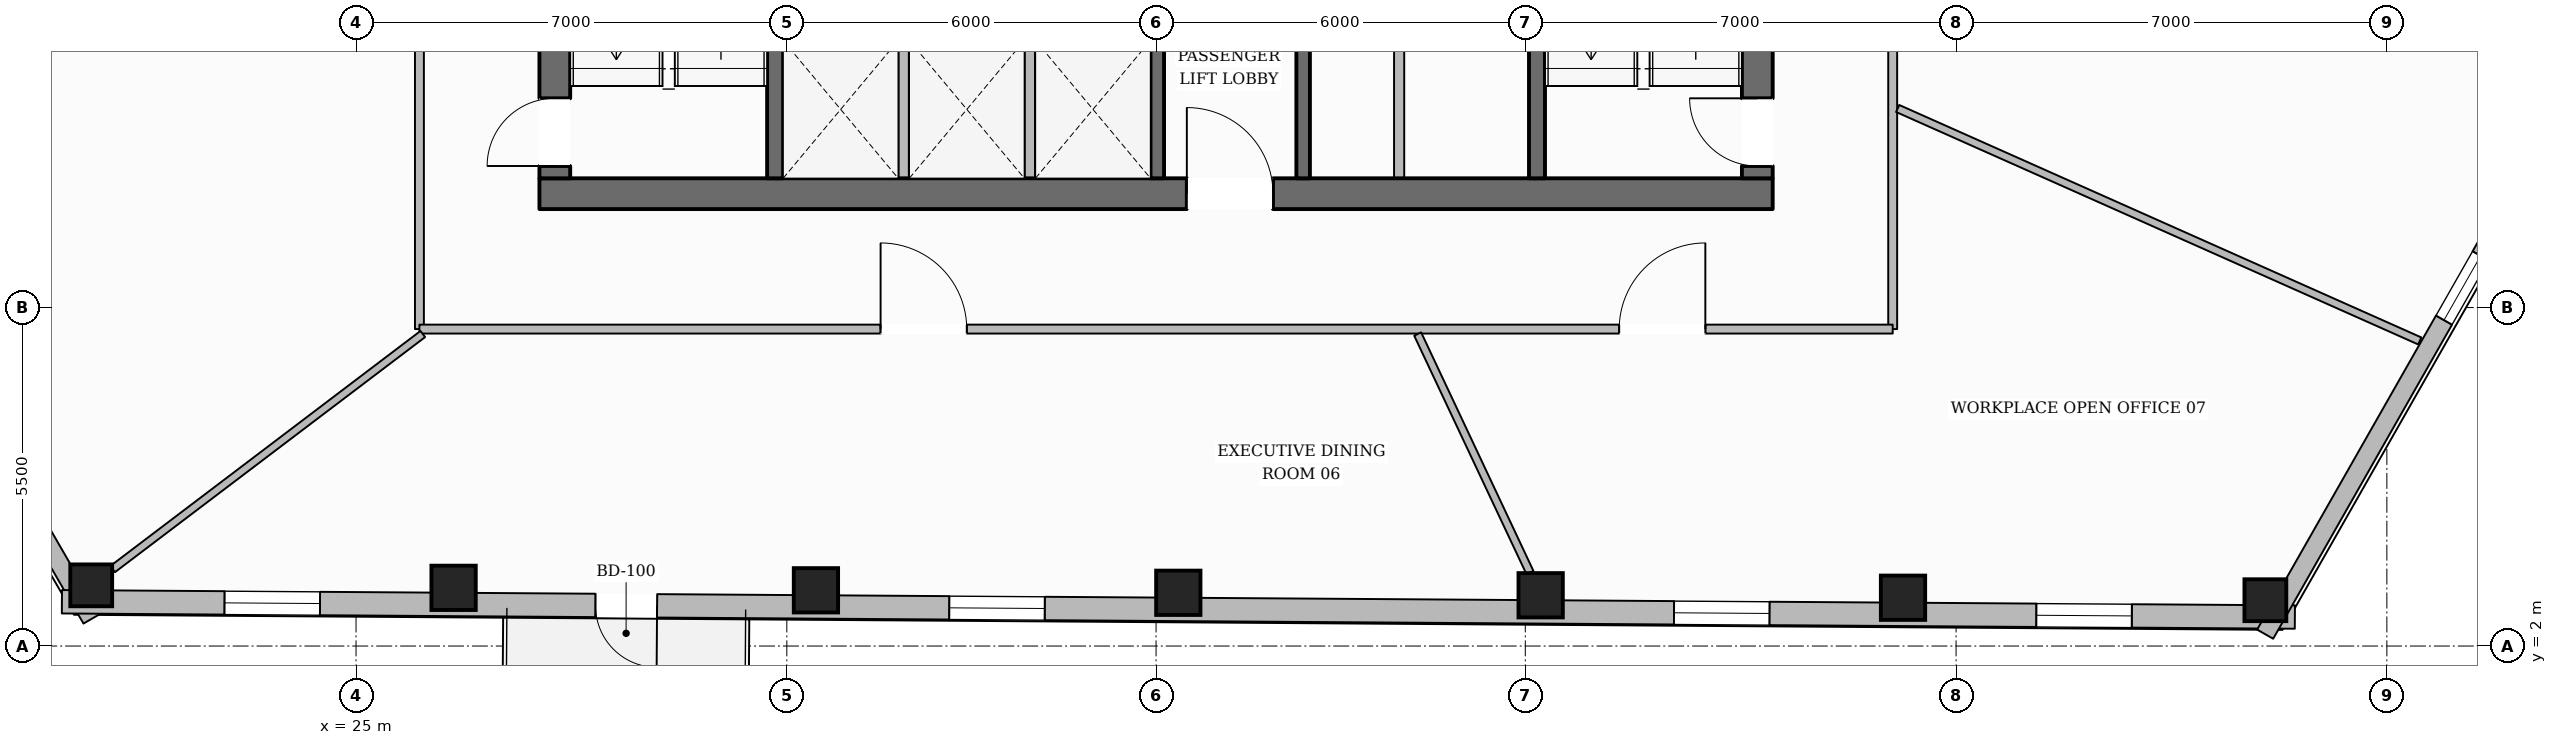
"""IFC4 building model, lengths in metres.
Left out: names, types, materials, properties, quantities, classifications, styles, units other than length and angle.
Written with IfcOpenShell. Run it as: python <this file> out.ifc"""

import sys

from ifc_helpers import new_model, si_unit, direction, frame, frame_2d, origin, origin_2d, place, context, subcontext, project, spatial, rectangle, hollow_rectangle, extrude, element, fill, save


model = new_model("IFC4")
c1 = context("Model", 3, precision=1e-05, world=origin(), true_north=direction((0.0, 1.0)))
c2 = subcontext(c1, "Body", "Model", "MODEL_VIEW")
j1 = project(units=[si_unit("LENGTHUNIT", "METRE"), si_unit("PLANEANGLEUNIT", "RADIAN")], contexts=[c1])
p1 = place(None, origin())
s1 = spatial("IfcSite", under=j1, at=p1, CompositionType="ELEMENT")
p2 = place(p1, origin())
s2 = spatial("IfcBuilding", under=s1, at=p2, CompositionType="ELEMENT")
p3 = place(p2, frame((0.0, 0.0, 112.45)))
s3 = spatial("IfcBuildingStorey", under=s2, at=p3, CompositionType="ELEMENT", Elevation=112.45)
p4 = place(p3, frame((27.98, 9.35, 0.0), z_axis=(0.0, 0.0, 1.0), x_axis=(1.0, 0.0, 0.0)))
e1 = element("IfcWall", 1, at=p4, inside=s3, PredefinedType="SOLIDWALL", context=c2, shape_type="SweptSolid", body=[
    extrude(rectangle(XDim=20.04, YDim=0.5, at=frame_2d((10.02, 0.0))), origin(), (0.0, 0.0, 1.0), 3.6),
])
p5 = place(p4, frame((10.52, 0.0, 0.0)))
e2 = element("IfcOpeningElement", 2, at=p5, cuts=e1, PredefinedType="OPENING", context=c2, shape_type="SweptSolid", body=[
    extrude(rectangle(XDim=1.4, YDim=2.2, at=frame_2d((0.7, 1.1))), frame((0.0, 0.26, 0.0), z_axis=(0.0, -1.0, 0.0), x_axis=(1.0, 0.0, 0.0)), (0.0, 0.0, 1.0), 0.52),
])
p6 = place(p3, frame((28.23, 9.6, 0.0), z_axis=(0.0, 0.0, 1.0), x_axis=(0.0, 1.0, 0.0)))
e3 = element("IfcWall", 3, at=p6, inside=s3, PredefinedType="SOLIDWALL", context=c2, shape_type="SweptSolid", body=[
    extrude(rectangle(XDim=13.0, YDim=0.5, at=frame_2d((6.5, 0.0))), origin(), (0.0, 0.0, 1.0), 3.6),
])
p7 = place(p6, frame((0.2, 0.0, 0.0)))
e4 = element("IfcOpeningElement", 4, at=p7, cuts=e3, PredefinedType="OPENING", context=c2, shape_type="SweptSolid", body=[
    extrude(rectangle(XDim=1.1, YDim=2.15, at=frame_2d((0.55, 1.075))), frame((0.0, 0.26, 0.0), z_axis=(0.0, -1.0, 0.0), x_axis=(1.0, 0.0, 0.0)), (0.0, 0.0, 1.0), 0.52),
])
p8 = place(p6, frame((8.4, 0.0, 0.0)))
e5 = element("IfcOpeningElement", 5, at=p8, cuts=e3, PredefinedType="OPENING", context=c2, shape_type="SweptSolid", body=[
    extrude(rectangle(XDim=0.9, YDim=2.1, at=frame_2d((0.45, 1.05))), frame((0.0, 0.26, 0.0), z_axis=(0.0, -1.0, 0.0), x_axis=(1.0, 0.0, 0.0)), (0.0, 0.0, 1.0), 0.52),
])
p9 = place(p3, frame((47.77, 9.6, 0.0), z_axis=(0.0, 0.0, 1.0), x_axis=(0.0, 1.0, 0.0)))
e6 = element("IfcWall", 6, at=p9, inside=s3, PredefinedType="SOLIDWALL", context=c2, shape_type="SweptSolid", body=[
    extrude(rectangle(XDim=13.0, YDim=0.5, at=frame_2d((6.5, 0.0))), origin(), (0.0, 0.0, 1.0), 3.6),
])
p10 = place(p9, frame((0.2, 0.0, 0.0)))
e7 = element("IfcOpeningElement", 7, at=p10, cuts=e6, PredefinedType="OPENING", context=c2, shape_type="SweptSolid", body=[
    extrude(rectangle(XDim=1.1, YDim=2.15, at=frame_2d((0.55, 1.075))), frame((0.0, 0.26, 0.0), z_axis=(0.0, -1.0, 0.0), x_axis=(1.0, 0.0, 0.0)), (0.0, 0.0, 1.0), 0.52),
])
p11 = place(p9, frame((8.4, 0.0, 0.0)))
e8 = element("IfcOpeningElement", 8, at=p11, cuts=e6, PredefinedType="OPENING", context=c2, shape_type="SweptSolid", body=[
    extrude(rectangle(XDim=0.9, YDim=2.1, at=frame_2d((0.45, 1.05))), frame((0.0, 0.26, 0.0), z_axis=(0.0, -1.0, 0.0), x_axis=(1.0, 0.0, 0.0)), (0.0, 0.0, 1.0), 0.52),
])
p12 = place(p3, frame((31.81, 9.6, 0.0), z_axis=(0.0, 0.0, 1.0), x_axis=(0.0, 1.0, 0.0)))
e9 = element("IfcWall", 9, at=p12, inside=s3, PredefinedType="SHEAR", context=c2, shape_type="SweptSolid", body=[
    extrude(rectangle(XDim=13.0, YDim=0.26, at=frame_2d((6.5, 0.0))), origin(), (0.0, 0.0, 1.0), 3.6),
])
p13 = place(p12, frame((10.925, 0.0, 0.0)))
e10 = element("IfcOpeningElement", 10, at=p13, cuts=e9, PredefinedType="OPENING", context=c2, shape_type="SweptSolid", body=[
    extrude(rectangle(XDim=1.25, YDim=2.25, at=frame_2d((0.625, 1.125))), frame((0.0, 0.14, 0.0), z_axis=(0.0, -1.0, 0.0), x_axis=(1.0, 0.0, 0.0)), (0.0, 0.0, 1.0), 0.28),
])
p14 = place(p3, frame((44.19, 9.6, 0.0), z_axis=(0.0, 0.0, 1.0), x_axis=(0.0, 1.0, 0.0)))
e11 = element("IfcWall", 11, at=p14, inside=s3, PredefinedType="SHEAR", context=c2, shape_type="SweptSolid", body=[
    extrude(rectangle(XDim=13.0, YDim=0.26, at=frame_2d((6.5, 0.0))), origin(), (0.0, 0.0, 1.0), 3.6),
])
p15 = place(p14, frame((10.925, 0.0, 0.0)))
e12 = element("IfcOpeningElement", 12, at=p15, cuts=e11, PredefinedType="OPENING", context=c2, shape_type="SweptSolid", body=[
    extrude(rectangle(XDim=1.25, YDim=2.25, at=frame_2d((0.625, 1.125))), frame((0.0, 0.14, 0.0), z_axis=(0.0, -1.0, 0.0), x_axis=(1.0, 0.0, 0.0)), (0.0, 0.0, 1.0), 0.28),
])
for number, where, z_axis, x_axis in (
    (13, (38.02, 9.6, 0.0), (0.0, 0.0, 1.0), (0.0, 1.0, 0.0)),
    (14, (40.39, 9.6, 0.0), (0.0, 0.0, 1.0), (0.0, 1.0, 0.0)),
):
    element("IfcWall", number, at=place(p3, frame(where, z_axis=z_axis, x_axis=x_axis)), inside=s3, PredefinedType="SOLIDWALL", context=c2, shape_type="SweptSolid", body=[
        extrude(rectangle(XDim=2.24, YDim=0.22, at=frame_2d((1.12, 0.0))), origin(), (0.0, 0.0, 1.0), 3.6),
    ])
p16 = place(p3, frame((20.697, 2.986, 0.0), z_axis=(0.0, 0.0, 1.0), x_axis=(1.0, 0.0, 0.0)))
e15 = element("IfcColumn", 15, at=p16, inside=s3, PredefinedType="COLUMN", context=c2, shape_type="SweptSolid", body=[
    extrude(hollow_rectangle(XDim=0.68, YDim=0.68, WallThickness=0.03, at=origin_2d()), origin(), (0.0, 0.0, 1.0), 3.6),
])
for number, where, z_axis, x_axis in (
    (16, (26.585, 2.946, 0.0), (0.0, 0.0, 1.0), (1.0, 0.0, 0.0)),
    (17, (32.473, 2.906, 0.0), (0.0, 0.0, 1.0), (1.0, 0.0, 0.0)),
    (18, (38.361, 2.865, 0.0), (0.0, 0.0, 1.0), (1.0, 0.0, 0.0)),
    (19, (44.25, 2.825, 0.0), (0.0, 0.0, 1.0), (1.0, 0.0, 0.0)),
    (20, (50.138, 2.785, 0.0), (0.0, 0.0, 1.0), (1.0, 0.0, 0.0)),
):
    element("IfcColumn", number, at=place(p3, frame(where, z_axis=z_axis, x_axis=x_axis)), inside=s3, PredefinedType="COLUMN", context=c2, shape_type="SweptSolid", body=[
        extrude(hollow_rectangle(XDim=0.72, YDim=0.72, WallThickness=0.032, at=origin_2d()), origin(), (0.0, 0.0, 1.0), 3.6),
    ])
p17 = place(p3, frame((56.026, 2.744, 0.0), z_axis=(0.0, 0.0, 1.0), x_axis=(1.0, 0.0, 0.0)))
e21 = element("IfcColumn", 21, at=p17, inside=s3, PredefinedType="COLUMN", context=c2, shape_type="SweptSolid", body=[
    extrude(hollow_rectangle(XDim=0.68, YDim=0.68, WallThickness=0.03, at=origin_2d()), origin(), (0.0, 0.0, 1.0), 3.6),
])
p18 = place(p3, frame((20.701, 2.44, 0.0), z_axis=(0.0, 0.0, 1.0), x_axis=(-0.50082386504, 0.86554922229, 0.0)))
e22 = element("IfcWall", 22, at=p18, inside=s3, PredefinedType="STANDARD", context=c2, shape_type="SweptSolid", body=[
    extrude(rectangle(XDim=13.095, YDim=0.3, at=frame_2d((6.548, 0.0))), origin(), (0.0, 0.0, 1.0), 3.059),
])
p19 = place(p18, frame((5.948, 0.0, 0.65)))
e23 = element("IfcOpeningElement", 23, at=p19, cuts=e22, PredefinedType="OPENING", context=c2, shape_type="SweptSolid", body=[
    extrude(rectangle(XDim=1.2, YDim=1.7, at=frame_2d((0.6, 0.85))), frame((0.0, 0.16, 0.0), z_axis=(0.0, -1.0, 0.0), x_axis=(1.0, 0.0, 0.0)), (0.0, 0.0, 1.0), 0.32),
])
p20 = place(p3, frame((56.505, 2.471, 0.0), z_axis=(0.0, 0.0, 1.0), x_axis=(-0.999976634765, 0.0068359289, 0.0)))
e24 = element("IfcWall", 24, at=p20, inside=s3, PredefinedType="STANDARD", context=c2, shape_type="SweptSolid", body=[
    extrude(rectangle(XDim=36.286, YDim=0.38, at=frame_2d((18.143, 0.0))), origin(), (0.0, 0.0, 1.0), 3.059),
])
p21 = place(p20, frame((26.614, 0.0, 0.0)))
e25 = element("IfcOpeningElement", 25, at=p21, cuts=e24, PredefinedType="OPENING", context=c2, shape_type="SweptSolid", body=[
    extrude(rectangle(XDim=1.0, YDim=2.2, at=frame_2d((0.5, 1.1))), frame((0.0, 0.2, 0.0), z_axis=(0.0, -1.0, 0.0), x_axis=(1.0, 0.0, 0.0)), (0.0, 0.0, 1.0), 0.4),
])
p22 = place(p20, frame((32.092, 0.0, 0.65)))
e26 = element("IfcOpeningElement", 26, at=p22, cuts=e24, PredefinedType="OPENING", context=c2, shape_type="SweptSolid", body=[
    extrude(rectangle(XDim=1.55, YDim=1.75, at=frame_2d((0.775, 0.875))), frame((0.0, 0.2, 0.0), z_axis=(0.0, -1.0, 0.0), x_axis=(1.0, 0.0, 0.0)), (0.0, 0.0, 1.0), 0.4),
])
p23 = place(p20, frame((20.315, 0.0, 0.65)))
e27 = element("IfcOpeningElement", 27, at=p23, cuts=e24, PredefinedType="OPENING", context=c2, shape_type="SweptSolid", body=[
    extrude(rectangle(XDim=1.55, YDim=1.75, at=frame_2d((0.775, 0.875))), frame((0.0, 0.2, 0.0), z_axis=(0.0, -1.0, 0.0), x_axis=(1.0, 0.0, 0.0)), (0.0, 0.0, 1.0), 0.4),
])
p24 = place(p20, frame((8.539, 0.0, 0.65)))
e28 = element("IfcOpeningElement", 28, at=p24, cuts=e24, PredefinedType="OPENING", context=c2, shape_type="SweptSolid", body=[
    extrude(rectangle(XDim=1.55, YDim=1.75, at=frame_2d((0.775, 0.875))), frame((0.0, 0.2, 0.0), z_axis=(0.0, -1.0, 0.0), x_axis=(1.0, 0.0, 0.0)), (0.0, 0.0, 1.0), 0.4),
])
p25 = place(p20, frame((2.65, 0.0, 0.65)))
e29 = element("IfcOpeningElement", 29, at=p25, cuts=e24, PredefinedType="OPENING", context=c2, shape_type="SweptSolid", body=[
    extrude(rectangle(XDim=1.55, YDim=1.75, at=frame_2d((0.775, 0.875))), frame((0.0, 0.2, 0.0), z_axis=(0.0, -1.0, 0.0), x_axis=(1.0, 0.0, 0.0)), (0.0, 0.0, 1.0), 0.4),
])
p26 = place(p3, frame((62.429, 13.442, 0.0), z_axis=(0.0, 0.0, 1.0), x_axis=(-0.49490368697, -0.868947835387, 0.0)))
e30 = element("IfcWall", 30, at=p26, inside=s3, PredefinedType="STANDARD", context=c2, shape_type="SweptSolid", body=[
    extrude(rectangle(XDim=12.946, YDim=0.3, at=frame_2d((6.473, 0.0))), origin(), (0.0, 0.0, 1.0), 3.059),
])
p27 = place(p26, frame((5.873, 0.0, 0.65)))
e31 = element("IfcOpeningElement", 31, at=p27, cuts=e30, PredefinedType="OPENING", context=c2, shape_type="SweptSolid", body=[
    extrude(rectangle(XDim=1.2, YDim=1.7, at=frame_2d((0.6, 0.85))), frame((0.0, 0.16, 0.0), z_axis=(0.0, -1.0, 0.0), x_axis=(1.0, 0.0, 0.0)), (0.0, 0.0, 1.0), 0.32),
])
for number, where, z_axis, x_axis in (
    (32, (33.9, 9.55, 0.0), (0.0, 0.0, 1.0), (0.0, 1.0, 0.0)),
    (33, (35.95, 9.55, 0.0), (0.0, 0.0, 1.0), (0.0, 1.0, 0.0)),
    (34, (41.95, 9.55, 0.0), (0.0, 0.0, 1.0), (0.0, 1.0, 0.0)),
):
    element("IfcWall", number, at=place(p3, frame(where, z_axis=z_axis, x_axis=x_axis)), inside=s3, PredefinedType="PARTITIONING", context=c2, shape_type="SweptSolid", body=[
        extrude(rectangle(XDim=2.29, YDim=0.165, at=frame_2d((1.145, 0.0))), origin(), (0.0, 0.0, 1.0), 3.6),
    ])
p28 = place(p3, frame((49.97, 7.15, 0.0), z_axis=(0.0, 0.0, 1.0), x_axis=(0.0, 1.0, 0.0)))
e35 = element("IfcWall", 35, at=p28, inside=s3, PredefinedType="PARTITIONING", context=c2, shape_type="SweptSolid", body=[
    extrude(rectangle(XDim=17.9, YDim=0.145, at=frame_2d((8.95, 0.0))), origin(), (0.0, 0.0, 1.0), 3.288),
])
p29 = place(p28, frame((8.222, 0.0, 0.0)))
e36 = element("IfcOpeningElement", 36, at=p29, cuts=e35, PredefinedType="OPENING", context=c2, shape_type="SweptSolid", body=[
    extrude(rectangle(XDim=1.02, YDim=2.15, at=frame_2d((0.51, 1.075))), frame((0.0, 0.083, 0.0), z_axis=(0.0, -1.0, 0.0), x_axis=(1.0, 0.0, 0.0)), (0.0, 0.0, 1.0), 0.165),
])
p30 = place(p3, frame((26.03, 25.05, 0.0), z_axis=(0.0, 0.0, 1.0), x_axis=(0.0, -1.0, 0.0)))
e37 = element("IfcWall", 37, at=p30, inside=s3, PredefinedType="PARTITIONING", context=c2, shape_type="SweptSolid", body=[
    extrude(rectangle(XDim=17.9, YDim=0.145, at=frame_2d((8.95, 0.0))), origin(), (0.0, 0.0, 1.0), 3.288),
])
p31 = place(p30, frame((3.333, 0.0, 0.0)))
e38 = element("IfcOpeningElement", 38, at=p31, cuts=e37, PredefinedType="OPENING", context=c2, shape_type="SweptSolid", body=[
    extrude(rectangle(XDim=0.98, YDim=2.15, at=frame_2d((0.49, 1.075))), frame((0.0, 0.083, 0.0), z_axis=(0.0, -1.0, 0.0), x_axis=(1.0, 0.0, 0.0)), (0.0, 0.0, 1.0), 0.165),
])
p32 = place(p30, frame((11.902, 0.0, 0.0)))
e39 = element("IfcOpeningElement", 39, at=p32, cuts=e37, PredefinedType="OPENING", context=c2, shape_type="SweptSolid", body=[
    extrude(rectangle(XDim=1.4, YDim=2.2, at=frame_2d((0.7, 1.1))), frame((0.0, 0.083, 0.0), z_axis=(0.0, -1.0, 0.0), x_axis=(1.0, 0.0, 0.0)), (0.0, 0.0, 1.0), 0.165),
])
p33 = place(p3, frame((26.03, 7.15, 0.0), z_axis=(0.0, 0.0, 1.0), x_axis=(1.0, 0.0, 0.0)))
e40 = element("IfcWall", 40, at=p33, inside=s3, PredefinedType="PARTITIONING", context=c2, shape_type="SweptSolid", body=[
    extrude(rectangle(XDim=23.94, YDim=0.145, at=frame_2d((11.97, 0.0))), origin(), (0.0, 0.0, 1.0), 3.6),
])
p34 = place(p33, frame((7.494, 0.0, 0.0)))
e41 = element("IfcOpeningElement", 41, at=p34, cuts=e40, PredefinedType="OPENING", context=c2, shape_type="SweptSolid", body=[
    extrude(rectangle(XDim=1.4, YDim=2.2, at=frame_2d((0.7, 1.1))), frame((0.0, 0.083, 0.0), z_axis=(0.0, -1.0, 0.0), x_axis=(1.0, 0.0, 0.0)), (0.0, 0.0, 1.0), 0.165),
])
p35 = place(p33, frame((19.496, 0.0, 0.0)))
e42 = element("IfcOpeningElement", 42, at=p35, cuts=e40, PredefinedType="OPENING", context=c2, shape_type="SweptSolid", body=[
    extrude(rectangle(XDim=1.4, YDim=2.2, at=frame_2d((0.7, 1.1))), frame((0.0, 0.083, 0.0), z_axis=(0.0, -1.0, 0.0), x_axis=(1.0, 0.0, 0.0)), (0.0, 0.0, 1.0), 0.165),
])
p36 = place(p3, frame((26.085, 7.07, 0.0), z_axis=(0.0, 0.0, 1.0), x_axis=(-0.796955292874, -0.604038294449, 0.0)))
e43 = element("IfcWall", 43, at=p36, inside=s3, PredefinedType="PARTITIONING", context=c2, shape_type="SweptSolid", body=[
    extrude(rectangle(XDim=6.324, YDim=0.125, at=frame_2d((3.162, 0.0))), origin(), (0.0, 0.0, 1.0), 3.141),
])
p37 = place(p3, frame((42.251, 7.07, 0.0), z_axis=(0.0, 0.0, 1.0), x_axis=(0.425915025218, -0.904763168621, 0.0)))
e44 = element("IfcWall", 44, at=p37, inside=s3, PredefinedType="PARTITIONING", context=c2, shape_type="SweptSolid", body=[
    extrude(rectangle(XDim=4.285, YDim=0.125, at=frame_2d((2.142, 0.0))), origin(), (0.0, 0.0, 1.0), 3.6),
])
p38 = place(p3, frame((50.051, 10.735, 0.0), z_axis=(0.0, 0.0, 1.0), x_axis=(0.913546845119, -0.406733526738, 0.0)))
e45 = element("IfcWall", 45, at=p38, inside=s3, PredefinedType="PARTITIONING", context=c2, shape_type="SweptSolid", body=[
    extrude(rectangle(XDim=9.287, YDim=0.125, at=frame_2d((4.644, 0.0))), origin(), (0.0, 0.0, 1.0), 3.6),
])
p39 = place(p21, origin())
e46 = element("IfcDoor", 46, at=p39, inside=s3, OperationType="SINGLE_SWING_LEFT", PredefinedType="DOOR", context=c2, shape_type="SweptSolid", body=[
    extrude(rectangle(XDim=1.0, YDim=2.2, at=frame_2d((0.5, 1.1))), frame((0.0, 0.025, 0.0), z_axis=(0.0, -1.0, 0.0), x_axis=(1.0, 0.0, 0.0)), (0.0, 0.0, 1.0), 0.05),
])
fill(e25, e46)
p40 = place(p22, origin())
e47 = element("IfcWindow", 47, at=p40, inside=s3, PartitioningType="SINGLE_PANEL", PredefinedType="WINDOW", context=c2, shape_type="SweptSolid", body=[
    extrude(rectangle(XDim=1.55, YDim=1.75, at=frame_2d((0.775, 0.875))), frame((0.0, 0.03, 0.0), z_axis=(0.0, -1.0, 0.0), x_axis=(1.0, 0.0, 0.0)), (0.0, 0.0, 1.0), 0.06),
])
fill(e26, e47)
p41 = place(p23, origin())
e48 = element("IfcWindow", 48, at=p41, inside=s3, PartitioningType="SINGLE_PANEL", PredefinedType="WINDOW", context=c2, shape_type="SweptSolid", body=[
    extrude(rectangle(XDim=1.55, YDim=1.75, at=frame_2d((0.775, 0.875))), frame((0.0, 0.03, 0.0), z_axis=(0.0, -1.0, 0.0), x_axis=(1.0, 0.0, 0.0)), (0.0, 0.0, 1.0), 0.06),
])
fill(e27, e48)
p42 = place(p24, origin())
e49 = element("IfcWindow", 49, at=p42, inside=s3, PartitioningType="SINGLE_PANEL", PredefinedType="WINDOW", context=c2, shape_type="SweptSolid", body=[
    extrude(rectangle(XDim=1.55, YDim=1.75, at=frame_2d((0.775, 0.875))), frame((0.0, 0.03, 0.0), z_axis=(0.0, -1.0, 0.0), x_axis=(1.0, 0.0, 0.0)), (0.0, 0.0, 1.0), 0.06),
])
fill(e28, e49)
p43 = place(p25, origin())
e50 = element("IfcWindow", 50, at=p43, inside=s3, PartitioningType="SINGLE_PANEL", PredefinedType="WINDOW", context=c2, shape_type="SweptSolid", body=[
    extrude(rectangle(XDim=1.55, YDim=1.75, at=frame_2d((0.775, 0.875))), frame((0.0, 0.03, 0.0), z_axis=(0.0, -1.0, 0.0), x_axis=(1.0, 0.0, 0.0)), (0.0, 0.0, 1.0), 0.06),
])
fill(e29, e50)
p44 = place(p27, origin())
e51 = element("IfcWindow", 51, at=p44, inside=s3, PartitioningType="SINGLE_PANEL", PredefinedType="WINDOW", context=c2, shape_type="SweptSolid", body=[
    extrude(rectangle(XDim=1.2, YDim=1.7, at=frame_2d((0.6, 0.85))), frame((0.0, 0.03, 0.0), z_axis=(0.0, -1.0, 0.0), x_axis=(1.0, 0.0, 0.0)), (0.0, 0.0, 1.0), 0.06),
])
fill(e31, e51)
p45 = place(p7, origin())
e52 = element("IfcDoor", 52, at=p45, inside=s3, OperationType="SINGLE_SWING_LEFT", PredefinedType="DOOR", context=c2, shape_type="SweptSolid", body=[
    extrude(rectangle(XDim=1.1, YDim=2.15, at=frame_2d((0.55, 1.075))), frame((0.0, 0.025, 0.0), z_axis=(0.0, -1.0, 0.0), x_axis=(1.0, 0.0, 0.0)), (0.0, 0.0, 1.0), 0.05),
])
fill(e4, e52)
p46 = place(p10, origin())
e53 = element("IfcDoor", 53, at=p46, inside=s3, OperationType="SINGLE_SWING_RIGHT", PredefinedType="DOOR", context=c2, shape_type="SweptSolid", body=[
    extrude(rectangle(XDim=1.1, YDim=2.15, at=frame_2d((0.55, 1.075))), frame((0.0, 0.025, 0.0), z_axis=(0.0, -1.0, 0.0), x_axis=(1.0, 0.0, 0.0)), (0.0, 0.0, 1.0), 0.05),
])
fill(e7, e53)
p47 = place(p5, origin())
e54 = element("IfcDoor", 54, at=p47, inside=s3, OperationType="SINGLE_SWING_LEFT", PredefinedType="DOOR", context=c2, shape_type="SweptSolid", body=[
    extrude(rectangle(XDim=1.4, YDim=2.2, at=frame_2d((0.7, 1.1))), frame((0.0, 0.025, 0.0), z_axis=(0.0, -1.0, 0.0), x_axis=(1.0, 0.0, 0.0)), (0.0, 0.0, 1.0), 0.05),
])
fill(e2, e54)
p48 = place(p34, origin())
e55 = element("IfcDoor", 55, at=p48, inside=s3, OperationType="SINGLE_SWING_LEFT", PredefinedType="DOOR", context=c2, shape_type="SweptSolid", body=[
    extrude(rectangle(XDim=1.4, YDim=2.2, at=frame_2d((0.7, 1.1))), frame((0.0, 0.025, 0.0), z_axis=(0.0, -1.0, 0.0), x_axis=(1.0, 0.0, 0.0)), (0.0, 0.0, 1.0), 0.05),
])
fill(e41, e55)
p49 = place(p35, origin())
e56 = element("IfcDoor", 56, at=p49, inside=s3, OperationType="SINGLE_SWING_RIGHT", PredefinedType="DOOR", context=c2, shape_type="SweptSolid", body=[
    extrude(rectangle(XDim=1.4, YDim=2.2, at=frame_2d((0.7, 1.1))), frame((0.0, 0.025, 0.0), z_axis=(0.0, -1.0, 0.0), x_axis=(1.0, 0.0, 0.0)), (0.0, 0.0, 1.0), 0.05),
])
fill(e42, e56)
save(model, sys.argv[1])
